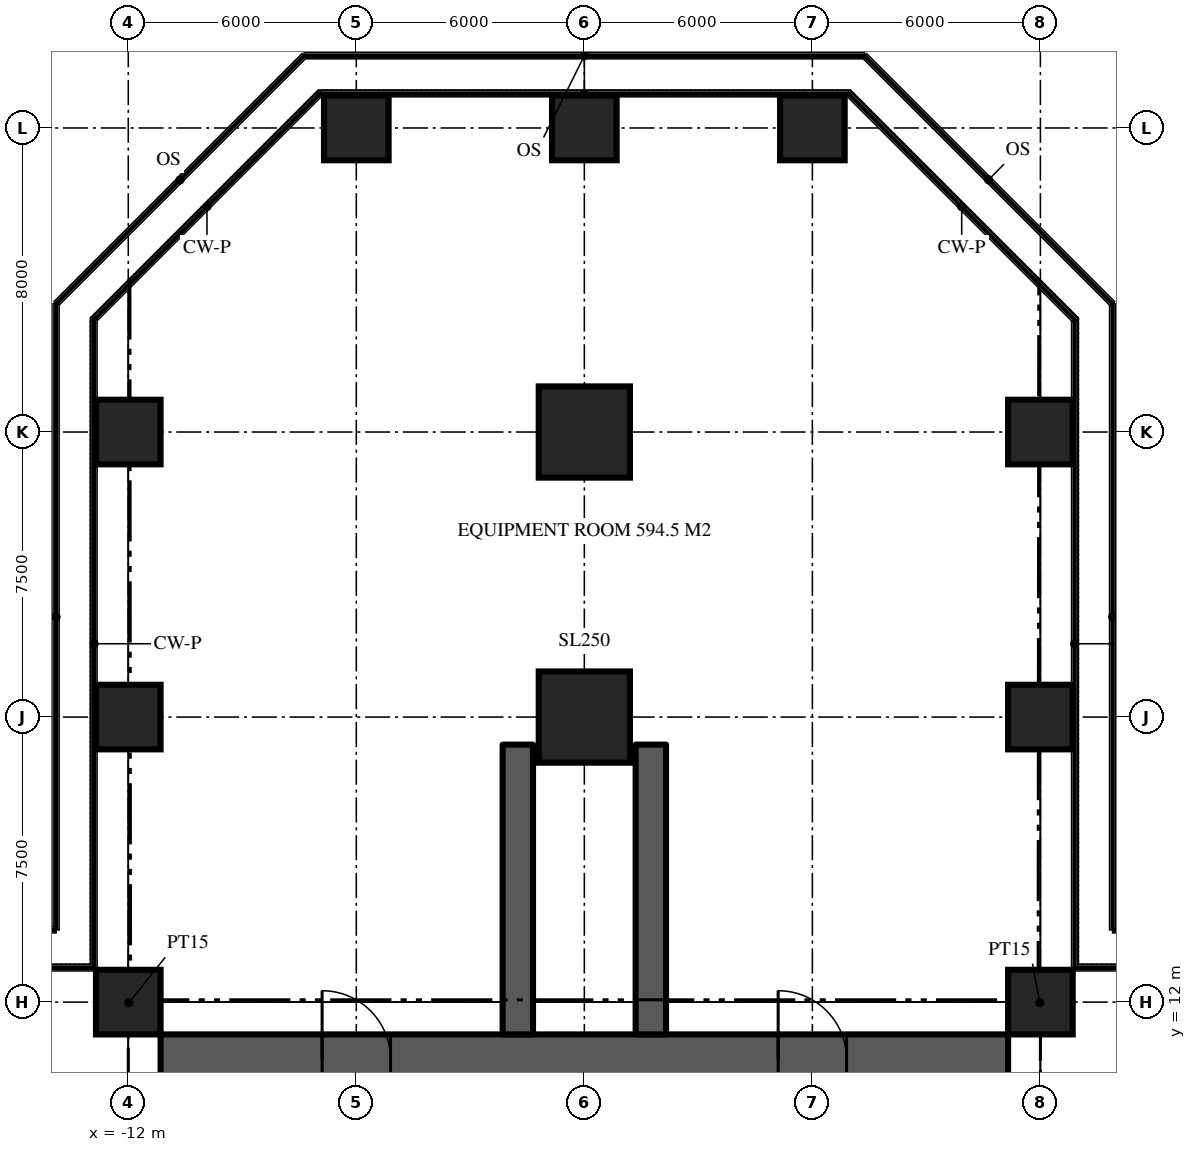
"""IFC4 building model, lengths in metres.
Left out: names, types, materials, properties, quantities, classifications, styles, units other than length and angle.
Written with IfcOpenShell. Run it as: python <this file> out.ifc"""

import sys

from ifc_helpers import new_model, si_unit, direction, frame, frame_2d, origin, origin_2d, place, context, subcontext, project, spatial, rectangle, extrude, element, fill, save


model = new_model("IFC4")
c1 = context("Model", 3, precision=1e-05, world=origin(), true_north=direction((0.0, 1.0)))
c2 = subcontext(c1, "Body", "Model", "MODEL_VIEW")
j1 = project(units=[si_unit("LENGTHUNIT", "METRE"), si_unit("PLANEANGLEUNIT", "RADIAN")], contexts=[c1])
p1 = place(None, origin())
s1 = spatial("IfcSite", under=j1, at=p1, CompositionType="ELEMENT")
p2 = place(p1, origin())
s2 = spatial("IfcBuilding", under=s1, at=p2, CompositionType="ELEMENT")
p3 = place(p2, frame((0.0, 0.0, 23.0)))
s3 = spatial("IfcBuildingStorey", under=s2, at=p3, CompositionType="ELEMENT", Elevation=23.0)
p4 = place(p3, frame((-11.15, 10.5, 0.0), z_axis=(0.0, 0.0, 1.0), x_axis=(1.0, 0.0, 0.0)))
e1 = element("IfcWall", 1, at=p4, inside=s3, PredefinedType="SHEAR", context=c2, shape_type="SweptSolid", body=[
    extrude(rectangle(XDim=22.3, YDim=1.3, at=frame_2d((11.15, 0.0))), origin(), (0.0, 0.0, 1.0), 5.0),
])
p5 = place(p4, frame((4.25, 0.0, 0.0)))
e2 = element("IfcOpeningElement", 2, at=p5, cuts=e1, PredefinedType="OPENING", context=c2, shape_type="SweptSolid", body=[
    extrude(rectangle(XDim=1.8, YDim=2.2, at=frame_2d((0.9, 1.1))), frame((0.0, 0.66, 0.0), z_axis=(0.0, -1.0, 0.0), x_axis=(1.0, 0.0, 0.0)), (0.0, 0.0, 1.0), 1.32),
])
p6 = place(p4, frame((16.25, 0.0, 0.0)))
e3 = element("IfcOpeningElement", 3, at=p6, cuts=e1, PredefinedType="OPENING", context=c2, shape_type="SweptSolid", body=[
    extrude(rectangle(XDim=1.8, YDim=2.2, at=frame_2d((0.9, 1.1))), frame((0.0, 0.66, 0.0), z_axis=(0.0, -1.0, 0.0), x_axis=(1.0, 0.0, 0.0)), (0.0, 0.0, 1.0), 1.32),
])
for number, where, z_axis, x_axis in (
    (4, (1.75, 11.15, 0.0), (0.0, 0.0, 1.0), (0.0, 1.0, 0.0)),
    (5, (-1.75, 11.15, 0.0), (0.0, 0.0, 1.0), (0.0, 1.0, 0.0)),
):
    element("IfcWall", number, at=place(p3, frame(where, z_axis=z_axis, x_axis=x_axis)), inside=s3, PredefinedType="SHEAR", context=c2, shape_type="SweptSolid", body=[
        extrude(rectangle(XDim=7.625, YDim=0.8, at=frame_2d((3.812, 0.0))), origin(), (0.0, 0.0, 1.0), 5.0),
    ])
for number, where, z_axis, x_axis in (
    (6, (-12.0, 12.0, 0.0), (0.0, 0.0, 1.0), (1.0, 0.0, 0.0)),
    (7, (12.0, 12.0, 0.0), (0.0, 0.0, 1.0), (1.0, 0.0, 0.0)),
    (8, (-12.0, 19.5, 0.0), (0.0, 0.0, 1.0), (1.0, 0.0, 0.0)),
):
    element("IfcColumn", number, at=place(p3, frame(where, z_axis=z_axis, x_axis=x_axis)), inside=s3, PredefinedType="COLUMN", context=c2, shape_type="SweptSolid", body=[
        extrude(rectangle(XDim=1.7, YDim=1.7, at=origin_2d()), origin(), (0.0, 0.0, 1.0), 5.0),
    ])
p7 = place(p3, frame((0.0, 19.5, 0.0), z_axis=(0.0, 0.0, 1.0), x_axis=(1.0, 0.0, 0.0)))
e9 = element("IfcColumn", 9, at=p7, inside=s3, PredefinedType="COLUMN", context=c2, shape_type="SweptSolid", body=[
    extrude(rectangle(XDim=2.4, YDim=2.4, at=origin_2d()), origin(), (0.0, 0.0, 1.0), 5.0),
])
for number, where, z_axis, x_axis in (
    (10, (12.0, 19.5, 0.0), (0.0, 0.0, 1.0), (1.0, 0.0, 0.0)),
    (11, (-12.0, 27.0, 0.0), (0.0, 0.0, 1.0), (1.0, 0.0, 0.0)),
):
    element("IfcColumn", number, at=place(p3, frame(where, z_axis=z_axis, x_axis=x_axis)), inside=s3, PredefinedType="COLUMN", context=c2, shape_type="SweptSolid", body=[
        extrude(rectangle(XDim=1.7, YDim=1.7, at=origin_2d()), origin(), (0.0, 0.0, 1.0), 5.0),
    ])
p8 = place(p3, frame((0.0, 27.0, 0.0), z_axis=(0.0, 0.0, 1.0), x_axis=(1.0, 0.0, 0.0)))
e12 = element("IfcColumn", 12, at=p8, inside=s3, PredefinedType="COLUMN", context=c2, shape_type="SweptSolid", body=[
    extrude(rectangle(XDim=2.4, YDim=2.4, at=origin_2d()), origin(), (0.0, 0.0, 1.0), 5.0),
])
for number, where, z_axis, x_axis in (
    (13, (12.0, 27.0, 0.0), (0.0, 0.0, 1.0), (1.0, 0.0, 0.0)),
    (14, (-6.0, 35.0, 0.0), (0.0, 0.0, 1.0), (1.0, 0.0, 0.0)),
    (15, (0.0, 35.0, 0.0), (0.0, 0.0, 1.0), (1.0, 0.0, 0.0)),
    (16, (6.0, 35.0, 0.0), (0.0, 0.0, 1.0), (1.0, 0.0, 0.0)),
):
    element("IfcColumn", number, at=place(p3, frame(where, z_axis=z_axis, x_axis=x_axis)), inside=s3, PredefinedType="COLUMN", context=c2, shape_type="SweptSolid", body=[
        extrude(rectangle(XDim=1.7, YDim=1.7, at=origin_2d()), origin(), (0.0, 0.0, 1.0), 5.0),
    ])
for number, where, z_axis, x_axis in (
    (17, (11.15, 11.15, 0.0), (0.0, 0.0, 1.0), (0.707, 0.707, 0.0)),
    (18, (-11.15, 11.15, 0.0), (0.0, 0.0, 1.0), (-0.707, 0.707, 0.0)),
):
    element("IfcWall", number, at=place(p3, frame(where, z_axis=z_axis, x_axis=x_axis)), inside=s3, PredefinedType="PARTITIONING", context=c2, shape_type="SweptSolid", body=[
        extrude(rectangle(XDim=2.362, YDim=0.15, at=frame_2d((1.181, 0.0))), origin(), (0.0, 0.0, 1.0), 4.75),
    ])
p9 = place(p5, origin())
e19 = element("IfcDoor", 19, at=p9, inside=s3, OperationType="DOUBLE_DOOR_DOUBLE_SWING", PredefinedType="DOOR", context=c2, shape_type="SweptSolid", body=[
    extrude(rectangle(XDim=1.8, YDim=2.2, at=frame_2d((0.9, 1.1))), frame((0.0, 0.025, 0.0), z_axis=(0.0, -1.0, 0.0), x_axis=(1.0, 0.0, 0.0)), (0.0, 0.0, 1.0), 0.05),
])
fill(e2, e19)
p10 = place(p6, origin())
e20 = element("IfcDoor", 20, at=p10, inside=s3, OperationType="DOUBLE_DOOR_DOUBLE_SWING", PredefinedType="DOOR", context=c2, shape_type="SweptSolid", body=[
    extrude(rectangle(XDim=1.8, YDim=2.2, at=frame_2d((0.9, 1.1))), frame((0.0, 0.025, 0.0), z_axis=(0.0, -1.0, 0.0), x_axis=(1.0, 0.0, 0.0)), (0.0, 0.0, 1.0), 0.05),
])
fill(e3, e20)
save(model, sys.argv[1])
